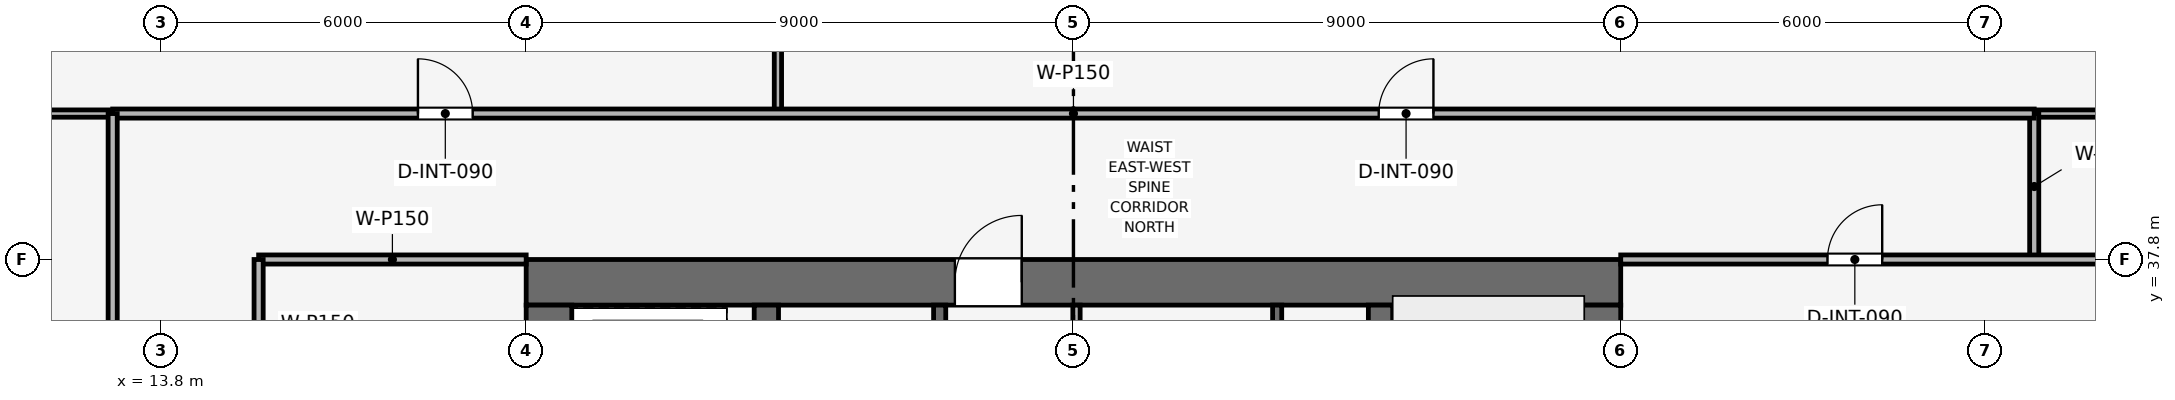
"""IFC4 building model, lengths in metres.
Left out: names, types, materials, properties, quantities, classifications, styles, units other than length and angle.
Written with IfcOpenShell. Run it as: python <this file> out.ifc"""

import sys

from ifc_helpers import new_model, si_unit, direction, frame, frame_2d, origin, place, context, subcontext, project, spatial, rectangle, extrude, element, fill, save


model = new_model("IFC4")
c1 = context("Model", 3, precision=1e-05, world=origin(), true_north=direction((0.0, 1.0)))
c2 = subcontext(c1, "Body", "Model", "MODEL_VIEW")
j1 = project(units=[si_unit("LENGTHUNIT", "METRE"), si_unit("PLANEANGLEUNIT", "RADIAN")], contexts=[c1])
p1 = place(None, origin())
s1 = spatial("IfcSite", under=j1, at=p1, CompositionType="ELEMENT")
p2 = place(p1, origin())
s2 = spatial("IfcBuilding", under=s1, at=p2, CompositionType="ELEMENT")
p3 = place(p2, frame((0.0, 0.0, 222.45)))
s3 = spatial("IfcBuildingStorey", under=s2, at=p3, CompositionType="ELEMENT", Elevation=222.45)
p4 = place(p3, frame((19.8, 37.425, 0.0), z_axis=(0.0, 0.0, 1.0), x_axis=(1.0, 0.0, 0.0)))
e1 = element("IfcWall", 1, at=p4, inside=s3, PredefinedType="SHEAR", context=c2, shape_type="SweptSolid", body=[
    extrude(rectangle(XDim=18.0, YDim=0.75, at=frame_2d((9.0, 0.0))), origin(), (0.0, 0.0, 1.0), 3.75),
])
p5 = place(p4, frame((7.05, 0.0, 0.0)))
e2 = element("IfcOpeningElement", 2, at=p5, cuts=e1, PredefinedType="OPENING", context=c2, shape_type="SweptSolid", body=[
    extrude(rectangle(XDim=1.1, YDim=2.15, at=frame_2d((0.55, 1.075))), frame((0.0, 0.385, 0.0), z_axis=(0.0, -1.0, 0.0), x_axis=(1.0, 0.0, 0.0)), (0.0, 0.0, 1.0), 0.77),
])
p6 = place(p3, frame((20.175, 20.55, 0.0), z_axis=(0.0, 0.0, 1.0), x_axis=(0.0, 1.0, 0.0)))
e3 = element("IfcWall", 3, at=p6, inside=s3, PredefinedType="SHEAR", context=c2, shape_type="SweptSolid", body=[
    extrude(rectangle(XDim=16.5, YDim=0.75, at=frame_2d((8.25, 0.0))), origin(), (0.0, 0.0, 1.0), 3.75),
])
p7 = place(p6, frame((10.25, 0.0, 0.0)))
e4 = element("IfcOpeningElement", 4, at=p7, cuts=e3, PredefinedType="OPENING", context=c2, shape_type="SweptSolid", body=[
    extrude(rectangle(XDim=1.1, YDim=2.15, at=frame_2d((0.55, 1.075))), frame((0.0, 0.385, 0.0), z_axis=(0.0, -1.0, 0.0), x_axis=(1.0, 0.0, 0.0)), (0.0, 0.0, 1.0), 0.77),
])
p8 = place(p3, frame((37.425, 20.55, 0.0), z_axis=(0.0, 0.0, 1.0), x_axis=(0.0, 1.0, 0.0)))
e5 = element("IfcWall", 5, at=p8, inside=s3, PredefinedType="SHEAR", context=c2, shape_type="SweptSolid", body=[
    extrude(rectangle(XDim=16.5, YDim=0.75, at=frame_2d((8.25, 0.0))), origin(), (0.0, 0.0, 1.0), 3.75),
])
p9 = place(p8, frame((4.75, 0.0, 0.0)))
e6 = element("IfcOpeningElement", 6, at=p9, cuts=e5, PredefinedType="OPENING", context=c2, shape_type="SweptSolid", body=[
    extrude(rectangle(XDim=1.1, YDim=2.15, at=frame_2d((0.55, 1.075))), frame((0.0, 0.385, 0.0), z_axis=(0.0, -1.0, 0.0), x_axis=(1.0, 0.0, 0.0)), (0.0, 0.0, 1.0), 0.77),
])
for number, where, z_axis, x_axis in (
    (7, (23.75, 20.55, 0.0), (0.0, 0.0, 1.0), (0.0, 1.0, 0.0)),
    (8, (33.85, 20.55, 0.0), (0.0, 0.0, 1.0), (0.0, 1.0, 0.0)),
):
    element("IfcWall", number, at=place(p3, frame(where, z_axis=z_axis, x_axis=x_axis)), inside=s3, PredefinedType="SHEAR", context=c2, shape_type="SweptSolid", body=[
        extrude(rectangle(XDim=16.5, YDim=0.4, at=frame_2d((8.25, 0.0))), origin(), (0.0, 0.0, 1.0), 3.75),
    ])
p10 = place(p3, frame((32.15, 34.0, 0.0), z_axis=(0.0, 0.0, 1.0), x_axis=(0.0, 1.0, 0.0)))
e9 = element("IfcWall", 9, at=p10, inside=s3, PredefinedType="SHEAR", context=c2, shape_type="SweptSolid", body=[
    extrude(rectangle(XDim=3.05, YDim=0.15, at=frame_2d((1.525, 0.0))), origin(), (0.0, 0.0, 1.0), 3.5),
])
p11 = place(p3, frame((26.6, 34.0, 0.0), z_axis=(0.0, 0.0, 1.0), x_axis=(0.0, 1.0, 0.0)))
e10 = element("IfcWall", 10, at=p11, inside=s3, PredefinedType="SHEAR", context=c2, shape_type="SweptSolid", body=[
    extrude(rectangle(XDim=3.05, YDim=0.2, at=frame_2d((1.525, 0.0))), origin(), (0.0, 0.0, 1.0), 3.5),
])
p12 = place(p11, frame((0.75, 0.0, 0.0)))
e11 = element("IfcOpeningElement", 11, at=p12, cuts=e10, PredefinedType="OPENING", context=c2, shape_type="SweptSolid", body=[
    extrude(rectangle(XDim=1.1, YDim=2.15, at=frame_2d((0.55, 1.075))), frame((0.0, 0.11, 0.0), z_axis=(0.0, -1.0, 0.0), x_axis=(1.0, 0.0, 0.0)), (0.0, 0.0, 1.0), 0.22),
])
p13 = place(p3, frame((28.85, 33.925, 0.0), z_axis=(0.0, 0.0, 1.0), x_axis=(0.0, 1.0, 0.0)))
e12 = element("IfcWall", 12, at=p13, inside=s3, PredefinedType="PARTITIONING", context=c2, shape_type="SweptSolid", body=[
    extrude(rectangle(XDim=3.125, YDim=0.12, at=frame_2d((1.562, 0.0))), origin(), (0.0, 0.0, 1.0), 3.5),
])
p14 = place(p13, frame((0.25, 0.0, 0.0)))
e13 = element("IfcOpeningElement", 13, at=p14, cuts=e12, PredefinedType="OPENING", context=c2, shape_type="SweptSolid", body=[
    extrude(rectangle(XDim=0.85, YDim=2.1, at=frame_2d((0.425, 1.05))), frame((0.0, 0.07, 0.0), z_axis=(0.0, -1.0, 0.0), x_axis=(1.0, 0.0, 0.0)), (0.0, 0.0, 1.0), 0.14),
])
p15 = place(p13, frame((1.72, 0.0, 0.0)))
e14 = element("IfcOpeningElement", 14, at=p15, cuts=e12, PredefinedType="OPENING", context=c2, shape_type="SweptSolid", body=[
    extrude(rectangle(XDim=0.85, YDim=2.1, at=frame_2d((0.425, 1.05))), frame((0.0, 0.07, 0.0), z_axis=(0.0, -1.0, 0.0), x_axis=(1.0, 0.0, 0.0)), (0.0, 0.0, 1.0), 0.14),
])
p16 = place(p3, frame((15.4, 37.8, 0.0), z_axis=(0.0, 0.0, 1.0), x_axis=(1.0, 0.0, 0.0)))
e15 = element("IfcWall", 15, at=p16, inside=s3, PredefinedType="PARTITIONING", context=c2, shape_type="SweptSolid", body=[
    extrude(rectangle(XDim=4.4, YDim=0.15, at=frame_2d((2.2, 0.0))), origin(), (0.0, 0.0, 1.0), 3.035),
])
p17 = place(p3, frame((15.4, 32.45, 0.0), z_axis=(0.0, 0.0, 1.0), x_axis=(0.0, 1.0, 0.0)))
e16 = element("IfcWall", 16, at=p17, inside=s3, PredefinedType="PARTITIONING", context=c2, shape_type="SweptSolid", body=[
    extrude(rectangle(XDim=5.35, YDim=0.15, at=frame_2d((2.675, 0.0))), origin(), (0.0, 0.0, 1.0), 3.035),
])
p18 = place(p17, frame((2.1, 0.0, 0.0)))
e17 = element("IfcOpeningElement", 17, at=p18, cuts=e16, PredefinedType="OPENING", context=c2, shape_type="SweptSolid", body=[
    extrude(rectangle(XDim=0.9, YDim=2.1, at=frame_2d((0.45, 1.05))), frame((0.0, 0.085, 0.0), z_axis=(0.0, -1.0, 0.0), x_axis=(1.0, 0.0, 0.0)), (0.0, 0.0, 1.0), 0.17),
])
p19 = place(p3, frame((23.94, 40.2, 0.0), z_axis=(0.0, 0.0, 1.0), x_axis=(0.0, 1.0, 0.0)))
e18 = element("IfcWall", 18, at=p19, inside=s3, PredefinedType="PARTITIONING", context=c2, shape_type="SweptSolid", body=[
    extrude(rectangle(XDim=15.47, YDim=0.12, at=frame_2d((7.735, 0.0))), origin(), (0.0, 0.0, 1.0), 2.885),
])
p20 = place(p3, frame((1.93, 40.2, 0.0), z_axis=(0.0, 0.0, 1.0), x_axis=(1.0, 0.0, 0.0)))
e19 = element("IfcWall", 19, at=p20, inside=s3, PredefinedType="PARTITIONING", context=c2, shape_type="SweptSolid", body=[
    extrude(rectangle(XDim=11.07, YDim=0.12, at=frame_2d((5.535, 0.0))), origin(), (0.0, 0.0, 1.0), 2.885),
])
p21 = place(p3, frame((44.6, 40.2, 0.0), z_axis=(0.0, 0.0, 1.0), x_axis=(1.0, 0.0, 0.0)))
e20 = element("IfcWall", 20, at=p21, inside=s3, PredefinedType="PARTITIONING", context=c2, shape_type="SweptSolid", body=[
    extrude(rectangle(XDim=11.07, YDim=0.12, at=frame_2d((5.535, 0.0))), origin(), (0.0, 0.0, 1.0), 2.885),
])
p22 = place(p3, frame((44.6, 37.8, 0.0), z_axis=(0.0, 0.0, 1.0), x_axis=(0.0, 1.0, 0.0)))
e21 = element("IfcWall", 21, at=p22, inside=s3, PredefinedType="PARTITIONING", context=c2, shape_type="SweptSolid", body=[
    extrude(rectangle(XDim=2.4, YDim=0.15, at=frame_2d((1.2, 0.0))), origin(), (0.0, 0.0, 1.0), 3.5),
])
p23 = place(p3, frame((37.8, 37.8, 0.0), z_axis=(0.0, 0.0, 1.0), x_axis=(1.0, 0.0, 0.0)))
e22 = element("IfcWall", 22, at=p23, inside=s3, PredefinedType="PARTITIONING", context=c2, shape_type="SweptSolid", body=[
    extrude(rectangle(XDim=17.87, YDim=0.15, at=frame_2d((8.935, 0.0))), origin(), (0.0, 0.0, 1.0), 2.885),
])
p24 = place(p23, frame((3.4, 0.0, 0.0)))
e23 = element("IfcOpeningElement", 23, at=p24, cuts=e22, PredefinedType="OPENING", context=c2, shape_type="SweptSolid", body=[
    extrude(rectangle(XDim=0.9, YDim=2.1, at=frame_2d((0.45, 1.05))), frame((0.0, 0.085, 0.0), z_axis=(0.0, -1.0, 0.0), x_axis=(1.0, 0.0, 0.0)), (0.0, 0.0, 1.0), 0.17),
])
p25 = place(p3, frame((13.0, 40.2, 0.0), z_axis=(0.0, 0.0, 1.0), x_axis=(1.0, 0.0, 0.0)))
e24 = element("IfcWall", 24, at=p25, inside=s3, PredefinedType="PARTITIONING", context=c2, shape_type="SweptSolid", body=[
    extrude(rectangle(XDim=31.6, YDim=0.15, at=frame_2d((15.8, 0.0))), origin(), (0.0, 0.0, 1.0), 3.035),
])
p26 = place(p25, frame((5.02, 0.0, 0.0)))
e25 = element("IfcOpeningElement", 25, at=p26, cuts=e24, PredefinedType="OPENING", context=c2, shape_type="SweptSolid", body=[
    extrude(rectangle(XDim=0.9, YDim=2.1, at=frame_2d((0.45, 1.05))), frame((0.0, 0.085, 0.0), z_axis=(0.0, -1.0, 0.0), x_axis=(1.0, 0.0, 0.0)), (0.0, 0.0, 1.0), 0.17),
])
p27 = place(p25, frame((20.82, 0.0, 0.0)))
e26 = element("IfcOpeningElement", 26, at=p27, cuts=e24, PredefinedType="OPENING", context=c2, shape_type="SweptSolid", body=[
    extrude(rectangle(XDim=0.9, YDim=2.1, at=frame_2d((0.45, 1.05))), frame((0.0, 0.085, 0.0), z_axis=(0.0, -1.0, 0.0), x_axis=(1.0, 0.0, 0.0)), (0.0, 0.0, 1.0), 0.17),
])
p28 = place(p3, frame((13.0, 17.4, 0.0), z_axis=(0.0, 0.0, 1.0), x_axis=(0.0, 1.0, 0.0)))
e27 = element("IfcWall", 27, at=p28, inside=s3, PredefinedType="PARTITIONING", context=c2, shape_type="SweptSolid", body=[
    extrude(rectangle(XDim=22.8, YDim=0.15, at=frame_2d((11.4, 0.0))), origin(), (0.0, 0.0, 1.0), 3.035),
])
p29 = place(p28, frame((3.1, 0.0, 0.0)))
e28 = element("IfcOpeningElement", 28, at=p29, cuts=e27, PredefinedType="OPENING", context=c2, shape_type="SweptSolid", body=[
    extrude(rectangle(XDim=0.9, YDim=2.1, at=frame_2d((0.45, 1.05))), frame((0.0, 0.085, 0.0), z_axis=(0.0, -1.0, 0.0), x_axis=(1.0, 0.0, 0.0)), (0.0, 0.0, 1.0), 0.17),
])
p30 = place(p28, frame((7.685, 0.0, 0.0)))
e29 = element("IfcOpeningElement", 29, at=p30, cuts=e27, PredefinedType="OPENING", context=c2, shape_type="SweptSolid", body=[
    extrude(rectangle(XDim=0.9, YDim=2.1, at=frame_2d((0.45, 1.05))), frame((0.0, 0.085, 0.0), z_axis=(0.0, -1.0, 0.0), x_axis=(1.0, 0.0, 0.0)), (0.0, 0.0, 1.0), 0.17),
])
p31 = place(p28, frame((15.535, 0.0, 0.0)))
e30 = element("IfcOpeningElement", 30, at=p31, cuts=e27, PredefinedType="OPENING", context=c2, shape_type="SweptSolid", body=[
    extrude(rectangle(XDim=0.9, YDim=2.1, at=frame_2d((0.45, 1.05))), frame((0.0, 0.085, 0.0), z_axis=(0.0, -1.0, 0.0), x_axis=(1.0, 0.0, 0.0)), (0.0, 0.0, 1.0), 0.17),
])
p32 = place(p24, origin())
e31 = element("IfcDoor", 31, at=p32, inside=s3, OperationType="SINGLE_SWING_RIGHT", PredefinedType="DOOR", context=c2, shape_type="SweptSolid", body=[
    extrude(rectangle(XDim=0.9, YDim=2.1, at=frame_2d((0.45, 1.05))), frame((0.0, 0.025, 0.0), z_axis=(0.0, -1.0, 0.0), x_axis=(1.0, 0.0, 0.0)), (0.0, 0.0, 1.0), 0.05),
])
fill(e23, e31)
p33 = place(p26, origin())
e32 = element("IfcDoor", 32, at=p33, inside=s3, OperationType="SINGLE_SWING_LEFT", PredefinedType="DOOR", context=c2, shape_type="SweptSolid", body=[
    extrude(rectangle(XDim=0.9, YDim=2.1, at=frame_2d((0.45, 1.05))), frame((0.0, 0.025, 0.0), z_axis=(0.0, -1.0, 0.0), x_axis=(1.0, 0.0, 0.0)), (0.0, 0.0, 1.0), 0.05),
])
fill(e25, e32)
p34 = place(p27, origin())
e33 = element("IfcDoor", 33, at=p34, inside=s3, OperationType="SINGLE_SWING_RIGHT", PredefinedType="DOOR", context=c2, shape_type="SweptSolid", body=[
    extrude(rectangle(XDim=0.9, YDim=2.1, at=frame_2d((0.45, 1.05))), frame((0.0, 0.025, 0.0), z_axis=(0.0, -1.0, 0.0), x_axis=(1.0, 0.0, 0.0)), (0.0, 0.0, 1.0), 0.05),
])
fill(e26, e33)
p35 = place(p5, origin())
e34 = element("IfcDoor", 34, at=p35, inside=s3, OperationType="SINGLE_SWING_RIGHT", PredefinedType="DOOR", context=c2, shape_type="SweptSolid", body=[
    extrude(rectangle(XDim=1.1, YDim=2.15, at=frame_2d((0.55, 1.075))), frame((0.0, 0.025, 0.0), z_axis=(0.0, -1.0, 0.0), x_axis=(1.0, 0.0, 0.0)), (0.0, 0.0, 1.0), 0.05),
])
fill(e2, e34)
save(model, sys.argv[1])
